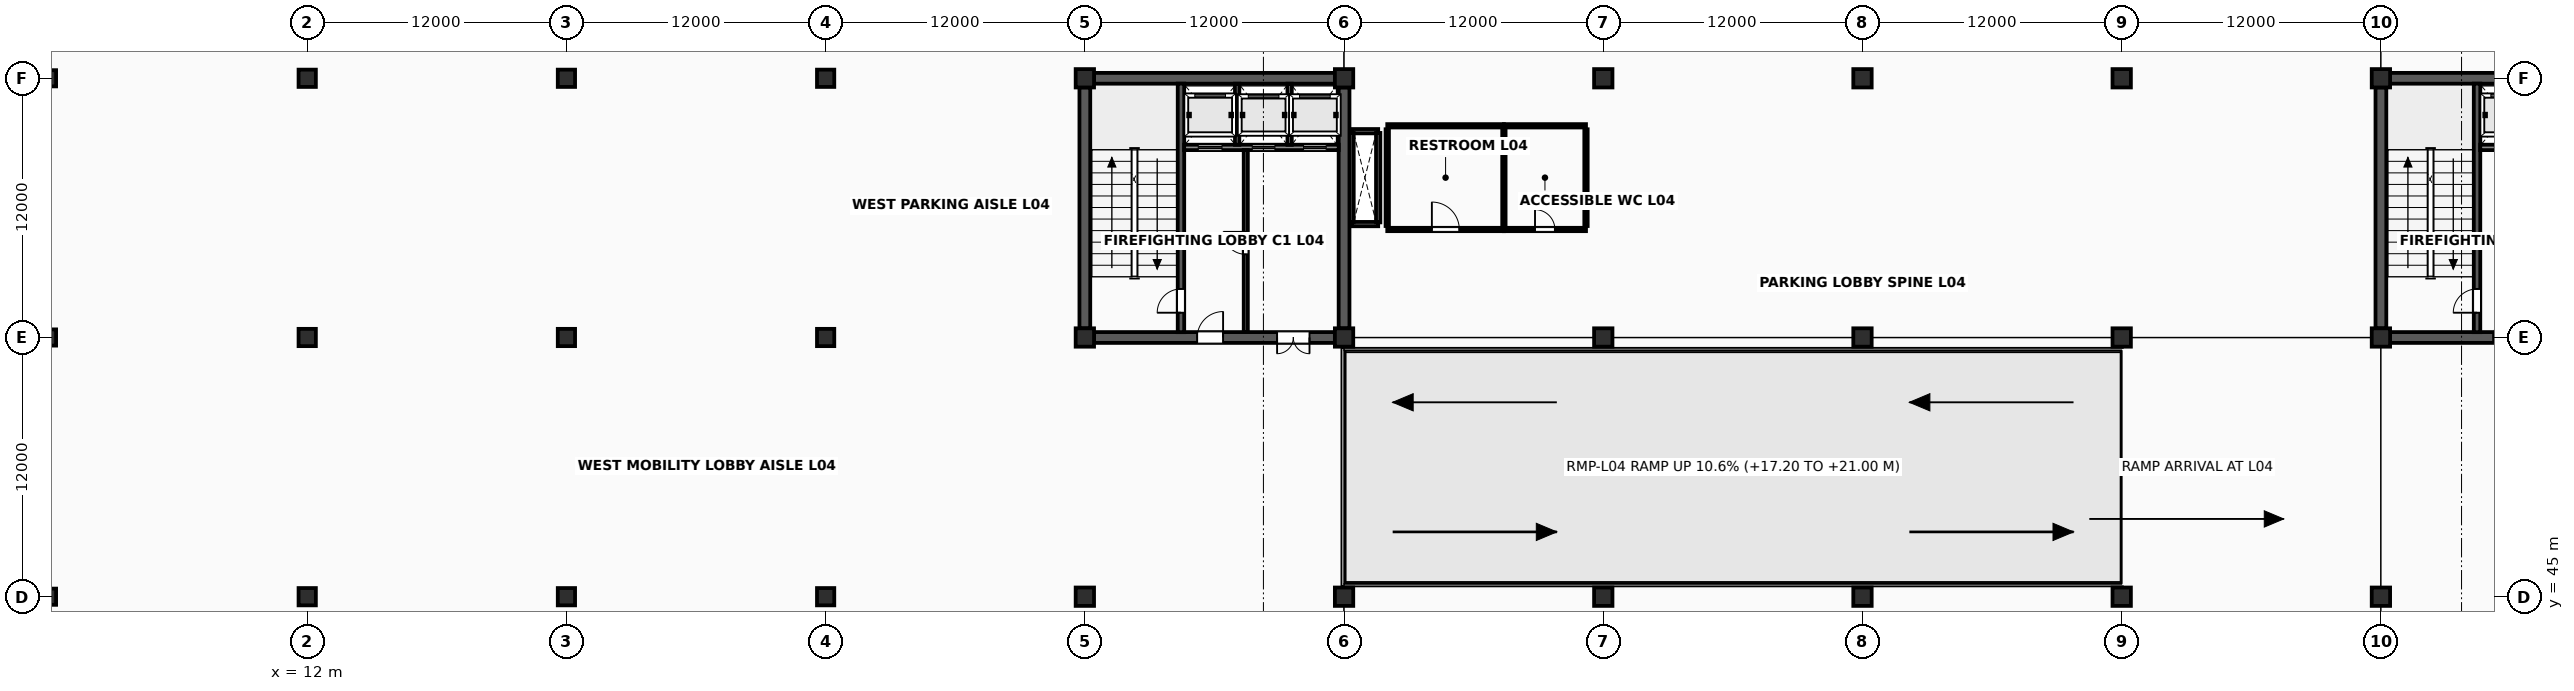
"""IFC4 building model, lengths in metres.
Left out: names, types, materials, properties, quantities, classifications, styles, units other than length and angle.
Written with IfcOpenShell. Run it as: python <this file> out.ifc"""

import sys

from ifc_helpers import new_model, si_unit, direction, frame, frame_2d, origin, origin_2d, place, context, subcontext, project, spatial, rectangle, extrude, element, fill, save


model = new_model("IFC4")
c1 = context("Model", 3, precision=1e-05, world=origin(), true_north=direction((0.0, 1.0)))
c2 = subcontext(c1, "Body", "Model", "MODEL_VIEW")
j1 = project(units=[si_unit("LENGTHUNIT", "METRE"), si_unit("PLANEANGLEUNIT", "RADIAN")], contexts=[c1])
p1 = place(None, origin())
s1 = spatial("IfcSite", under=j1, at=p1, CompositionType="ELEMENT")
p2 = place(p1, origin())
s2 = spatial("IfcBuilding", under=s1, at=p2, CompositionType="ELEMENT")
p3 = place(p2, frame((0.0, 0.0, 17.2)))
s3 = spatial("IfcBuildingStorey", under=s2, at=p3, CompositionType="ELEMENT", Elevation=17.2)
for number, where, z_axis, x_axis in (
    (1, (0.0, 45.0, 0.0), (0.0, 0.0, 1.0), (1.0, 0.0, 0.0)),
    (2, (0.0, 57.0, 0.0), (0.0, 0.0, 1.0), (1.0, 0.0, 0.0)),
    (3, (0.0, 69.0, 0.0), (0.0, 0.0, 1.0), (1.0, 0.0, 0.0)),
):
    element("IfcColumn", number, at=place(p3, frame(where, z_axis=z_axis, x_axis=x_axis)), inside=s3, PredefinedType="COLUMN", context=c2, shape_type="SweptSolid", body=[
        extrude(rectangle(XDim=0.75, YDim=0.75, at=origin_2d()), origin(), (0.0, 0.0, 1.0), 3.8),
    ])
for number, where, z_axis, x_axis in (
    (4, (12.0, 45.0, 0.0), (0.0, 0.0, 1.0), (1.0, 0.0, 0.0)),
    (5, (12.0, 57.0, 0.0), (0.0, 0.0, 1.0), (1.0, 0.0, 0.0)),
    (6, (12.0, 69.0, 0.0), (0.0, 0.0, 1.0), (1.0, 0.0, 0.0)),
    (7, (24.0, 45.0, 0.0), (0.0, 0.0, 1.0), (1.0, 0.0, 0.0)),
    (8, (24.0, 57.0, 0.0), (0.0, 0.0, 1.0), (1.0, 0.0, 0.0)),
    (9, (24.0, 69.0, 0.0), (0.0, 0.0, 1.0), (1.0, 0.0, 0.0)),
    (10, (36.0, 45.0, 0.0), (0.0, 0.0, 1.0), (1.0, 0.0, 0.0)),
    (11, (36.0, 57.0, 0.0), (0.0, 0.0, 1.0), (1.0, 0.0, 0.0)),
    (12, (36.0, 69.0, 0.0), (0.0, 0.0, 1.0), (1.0, 0.0, 0.0)),
):
    element("IfcColumn", number, at=place(p3, frame(where, z_axis=z_axis, x_axis=x_axis)), inside=s3, PredefinedType="COLUMN", context=c2, shape_type="SweptSolid", body=[
        extrude(rectangle(XDim=0.8, YDim=0.8, at=origin_2d()), origin(), (0.0, 0.0, 1.0), 3.8),
    ])
for number, where, z_axis, x_axis in (
    (13, (48.0, 45.0, 0.0), (0.0, 0.0, 1.0), (1.0, 0.0, 0.0)),
    (14, (48.0, 57.0, 0.0), (0.0, 0.0, 1.0), (1.0, 0.0, 0.0)),
    (15, (48.0, 69.0, 0.0), (0.0, 0.0, 1.0), (1.0, 0.0, 0.0)),
    (16, (60.0, 45.0, 0.0), (0.0, 0.0, 1.0), (1.0, 0.0, 0.0)),
    (17, (60.0, 57.0, 0.0), (0.0, 0.0, 1.0), (1.0, 0.0, 0.0)),
    (18, (60.0, 69.0, 0.0), (0.0, 0.0, 1.0), (1.0, 0.0, 0.0)),
    (19, (72.0, 45.0, 0.0), (0.0, 0.0, 1.0), (1.0, 0.0, 0.0)),
    (20, (72.0, 57.0, 0.0), (0.0, 0.0, 1.0), (1.0, 0.0, 0.0)),
    (21, (72.0, 69.0, 0.0), (0.0, 0.0, 1.0), (1.0, 0.0, 0.0)),
    (22, (84.0, 45.0, 0.0), (0.0, 0.0, 1.0), (1.0, 0.0, 0.0)),
    (23, (84.0, 57.0, 0.0), (0.0, 0.0, 1.0), (1.0, 0.0, 0.0)),
    (24, (84.0, 69.0, 0.0), (0.0, 0.0, 1.0), (1.0, 0.0, 0.0)),
    (25, (96.0, 45.0, 0.0), (0.0, 0.0, 1.0), (1.0, 0.0, 0.0)),
    (26, (96.0, 57.0, 0.0), (0.0, 0.0, 1.0), (1.0, 0.0, 0.0)),
    (27, (96.0, 69.0, 0.0), (0.0, 0.0, 1.0), (1.0, 0.0, 0.0)),
    (28, (108.0, 45.0, 0.0), (0.0, 0.0, 1.0), (1.0, 0.0, 0.0)),
    (29, (108.0, 57.0, 0.0), (0.0, 0.0, 1.0), (1.0, 0.0, 0.0)),
    (30, (108.0, 69.0, 0.0), (0.0, 0.0, 1.0), (1.0, 0.0, 0.0)),
):
    element("IfcColumn", number, at=place(p3, frame(where, z_axis=z_axis, x_axis=x_axis)), inside=s3, PredefinedType="COLUMN", context=c2, shape_type="SweptSolid", body=[
        extrude(rectangle(XDim=0.85, YDim=0.85, at=origin_2d()), origin(), (0.0, 0.0, 1.0), 3.8),
    ])
for number, where, z_axis, x_axis in (
    (31, (60.347, 62.25, 0.0), (0.0, 0.0, 1.0), (1.0, 0.0, 0.0)),
    (32, (60.347, 66.55, 0.0), (0.0, 0.0, 1.0), (1.0, 0.0, 0.0)),
):
    element("IfcWall", number, at=place(p3, frame(where, z_axis=z_axis, x_axis=x_axis)), inside=s3, PredefinedType="SOLIDWALL", context=c2, shape_type="SweptSolid", body=[
        extrude(rectangle(XDim=1.233, YDim=0.2, at=frame_2d((0.617, 0.0))), origin(), (0.0, 0.0, 1.0), 3.643),
    ])
for number, where, z_axis, x_axis in (
    (33, (60.347, 62.33, 0.0), (0.0, 0.0, 1.0), (0.0, 1.0, 0.0)),
    (34, (61.58, 62.33, 0.0), (0.0, 0.0, 1.0), (0.0, 1.0, 0.0)),
):
    element("IfcWall", number, at=place(p3, frame(where, z_axis=z_axis, x_axis=x_axis)), inside=s3, PredefinedType="SOLIDWALL", context=c2, shape_type="SweptSolid", body=[
        extrude(rectangle(XDim=4.14, YDim=0.2, at=frame_2d((2.07, 0.0))), origin(), (0.0, 0.0, 1.0), 3.643),
    ])
p4 = place(p3, frame((48.422, 57.0, 0.0), z_axis=(0.0, 0.0, 1.0), x_axis=(1.0, 0.0, 0.0)))
e35 = element("IfcWall", 35, at=p4, inside=s3, PredefinedType="SHEAR", context=c2, shape_type="SweptSolid", body=[
    extrude(rectangle(XDim=11.156, YDim=0.5, at=frame_2d((5.578, 0.0))), origin(), (0.0, 0.0, 1.0), 3.643),
])
p5 = place(p4, frame((4.778, 0.0, 0.0)))
e36 = element("IfcOpeningElement", 36, at=p5, cuts=e35, PredefinedType="OPENING", context=c2, shape_type="SweptSolid", body=[
    extrude(rectangle(XDim=1.2, YDim=2.2, at=frame_2d((0.6, 1.1))), frame((0.0, 0.265, 0.0), z_axis=(0.0, -1.0, 0.0), x_axis=(1.0, 0.0, 0.0)), (0.0, 0.0, 1.0), 0.53),
])
p6 = place(p4, frame((8.478, 0.0, 0.0)))
e37 = element("IfcOpeningElement", 37, at=p6, cuts=e35, PredefinedType="OPENING", context=c2, shape_type="SweptSolid", body=[
    extrude(rectangle(XDim=1.5, YDim=2.25, at=frame_2d((0.75, 1.125))), frame((0.0, 0.265, 0.0), z_axis=(0.0, -1.0, 0.0), x_axis=(1.0, 0.0, 0.0)), (0.0, 0.0, 1.0), 0.53),
])
for number, where, z_axis, x_axis in (
    (38, (48.422, 69.0, 0.0), (0.0, 0.0, 1.0), (1.0, 0.0, 0.0)),
    (39, (48.0, 57.422, 0.0), (0.0, 0.0, 1.0), (0.0, 1.0, 0.0)),
    (40, (60.0, 57.422, 0.0), (0.0, 0.0, 1.0), (0.0, 1.0, 0.0)),
):
    element("IfcWall", number, at=place(p3, frame(where, z_axis=z_axis, x_axis=x_axis)), inside=s3, PredefinedType="SHEAR", context=c2, shape_type="SweptSolid", body=[
        extrude(rectangle(XDim=11.156, YDim=0.5, at=frame_2d((5.578, 0.0))), origin(), (0.0, 0.0, 1.0), 3.643),
    ])
p7 = place(p3, frame((52.45, 57.247, 0.0), z_axis=(0.0, 0.0, 1.0), x_axis=(0.0, 1.0, 0.0)))
e41 = element("IfcWall", 41, at=p7, inside=s3, PredefinedType="SHEAR", context=c2, shape_type="SweptSolid", body=[
    extrude(rectangle(XDim=11.506, YDim=0.3, at=frame_2d((5.753, 0.0))), origin(), (0.0, 0.0, 1.0), 3.643),
])
p8 = place(p7, frame((0.9, 0.0, 0.0)))
e42 = element("IfcOpeningElement", 42, at=p8, cuts=e41, PredefinedType="OPENING", context=c2, shape_type="SweptSolid", body=[
    extrude(rectangle(XDim=1.1, YDim=2.2, at=frame_2d((0.55, 1.1))), frame((0.0, 0.165, 0.0), z_axis=(0.0, -1.0, 0.0), x_axis=(1.0, 0.0, 0.0)), (0.0, 0.0, 1.0), 0.33),
])
p9 = place(p3, frame((52.597, 65.8, 0.0), z_axis=(0.0, 0.0, 1.0), x_axis=(1.0, 0.0, 0.0)))
e43 = element("IfcWall", 43, at=p9, inside=s3, PredefinedType="SOLIDWALL", context=c2, shape_type="SweptSolid", body=[
    extrude(rectangle(XDim=7.156, YDim=0.25, at=frame_2d((3.578, 0.0))), origin(), (0.0, 0.0, 1.0), 3.643),
])
p10 = place(p9, frame((0.653, 0.0, 0.0)))
e44 = element("IfcOpeningElement", 44, at=p10, cuts=e43, PredefinedType="OPENING", context=c2, shape_type="SweptSolid", body=[
    extrude(rectangle(XDim=1.1, YDim=2.24, at=frame_2d((0.55, 1.12))), frame((0.0, 0.14, 0.0), z_axis=(0.0, -1.0, 0.0), x_axis=(1.0, 0.0, 0.0)), (0.0, 0.0, 1.0), 0.28),
])
p11 = place(p9, frame((3.153, 0.0, 0.0)))
e45 = element("IfcOpeningElement", 45, at=p11, cuts=e43, PredefinedType="OPENING", context=c2, shape_type="SweptSolid", body=[
    extrude(rectangle(XDim=1.05, YDim=2.2, at=frame_2d((0.525, 1.1))), frame((0.0, 0.14, 0.0), z_axis=(0.0, -1.0, 0.0), x_axis=(1.0, 0.0, 0.0)), (0.0, 0.0, 1.0), 0.28),
])
p12 = place(p9, frame((5.528, 0.0, 0.0)))
e46 = element("IfcOpeningElement", 46, at=p12, cuts=e43, PredefinedType="OPENING", context=c2, shape_type="SweptSolid", body=[
    extrude(rectangle(XDim=1.05, YDim=2.2, at=frame_2d((0.525, 1.1))), frame((0.0, 0.14, 0.0), z_axis=(0.0, -1.0, 0.0), x_axis=(1.0, 0.0, 0.0)), (0.0, 0.0, 1.0), 0.28),
])
for number, where, z_axis, x_axis in (
    (47, (55.05, 65.92, 0.0), (0.0, 0.0, 1.0), (0.0, 1.0, 0.0)),
    (48, (57.48, 65.92, 0.0), (0.0, 0.0, 1.0), (0.0, 1.0, 0.0)),
):
    element("IfcWall", number, at=place(p3, frame(where, z_axis=z_axis, x_axis=x_axis)), inside=s3, PredefinedType="SOLIDWALL", context=c2, shape_type="SweptSolid", body=[
        extrude(rectangle(XDim=2.83, YDim=0.2, at=frame_2d((1.415, 0.0))), origin(), (0.0, 0.0, 1.0), 3.633),
    ])
p13 = place(p3, frame((55.45, 57.25, 0.0), z_axis=(0.0, 0.0, 1.0), x_axis=(0.0, 1.0, 0.0)))
e49 = element("IfcWall", 49, at=p13, inside=s3, PredefinedType="SOLIDWALL", context=c2, shape_type="SweptSolid", body=[
    extrude(rectangle(XDim=8.43, YDim=0.19, at=frame_2d((4.215, 0.0))), origin(), (0.0, 0.0, 1.0), 3.633),
])
p14 = place(p13, frame((3.6, 0.0, 0.0)))
e50 = element("IfcOpeningElement", 50, at=p14, cuts=e49, PredefinedType="OPENING", context=c2, shape_type="SweptSolid", body=[
    extrude(rectangle(XDim=1.04, YDim=2.18, at=frame_2d((0.52, 1.09))), frame((0.0, 0.11, 0.0), z_axis=(0.0, -1.0, 0.0), x_axis=(1.0, 0.0, 0.0)), (0.0, 0.0, 1.0), 0.22),
])
p15 = place(p3, frame((108.422, 57.0, 0.0), z_axis=(0.0, 0.0, 1.0), x_axis=(1.0, 0.0, 0.0)))
e51 = element("IfcWall", 51, at=p15, inside=s3, PredefinedType="SHEAR", context=c2, shape_type="SweptSolid", body=[
    extrude(rectangle(XDim=11.156, YDim=0.5, at=frame_2d((5.578, 0.0))), origin(), (0.0, 0.0, 1.0), 3.643),
])
p16 = place(p15, frame((4.778, 0.0, 0.0)))
e52 = element("IfcOpeningElement", 52, at=p16, cuts=e51, PredefinedType="OPENING", context=c2, shape_type="SweptSolid", body=[
    extrude(rectangle(XDim=1.2, YDim=2.2, at=frame_2d((0.6, 1.1))), frame((0.0, 0.265, 0.0), z_axis=(0.0, -1.0, 0.0), x_axis=(1.0, 0.0, 0.0)), (0.0, 0.0, 1.0), 0.53),
])
p17 = place(p15, frame((8.478, 0.0, 0.0)))
e53 = element("IfcOpeningElement", 53, at=p17, cuts=e51, PredefinedType="OPENING", context=c2, shape_type="SweptSolid", body=[
    extrude(rectangle(XDim=1.5, YDim=2.25, at=frame_2d((0.75, 1.125))), frame((0.0, 0.265, 0.0), z_axis=(0.0, -1.0, 0.0), x_axis=(1.0, 0.0, 0.0)), (0.0, 0.0, 1.0), 0.53),
])
for number, where, z_axis, x_axis in (
    (54, (108.422, 69.0, 0.0), (0.0, 0.0, 1.0), (1.0, 0.0, 0.0)),
    (55, (108.0, 57.422, 0.0), (0.0, 0.0, 1.0), (0.0, 1.0, 0.0)),
):
    element("IfcWall", number, at=place(p3, frame(where, z_axis=z_axis, x_axis=x_axis)), inside=s3, PredefinedType="SHEAR", context=c2, shape_type="SweptSolid", body=[
        extrude(rectangle(XDim=11.156, YDim=0.5, at=frame_2d((5.578, 0.0))), origin(), (0.0, 0.0, 1.0), 3.643),
    ])
p18 = place(p3, frame((112.45, 57.247, 0.0), z_axis=(0.0, 0.0, 1.0), x_axis=(0.0, 1.0, 0.0)))
e56 = element("IfcWall", 56, at=p18, inside=s3, PredefinedType="SHEAR", context=c2, shape_type="SweptSolid", body=[
    extrude(rectangle(XDim=11.506, YDim=0.3, at=frame_2d((5.753, 0.0))), origin(), (0.0, 0.0, 1.0), 3.643),
])
p19 = place(p18, frame((0.9, 0.0, 0.0)))
e57 = element("IfcOpeningElement", 57, at=p19, cuts=e56, PredefinedType="OPENING", context=c2, shape_type="SweptSolid", body=[
    extrude(rectangle(XDim=1.1, YDim=2.2, at=frame_2d((0.55, 1.1))), frame((0.0, 0.165, 0.0), z_axis=(0.0, -1.0, 0.0), x_axis=(1.0, 0.0, 0.0)), (0.0, 0.0, 1.0), 0.33),
])
p20 = place(p3, frame((112.597, 65.8, 0.0), z_axis=(0.0, 0.0, 1.0), x_axis=(1.0, 0.0, 0.0)))
e58 = element("IfcWall", 58, at=p20, inside=s3, PredefinedType="SOLIDWALL", context=c2, shape_type="SweptSolid", body=[
    extrude(rectangle(XDim=7.156, YDim=0.25, at=frame_2d((3.578, 0.0))), origin(), (0.0, 0.0, 1.0), 3.643),
])
p21 = place(p20, frame((0.653, 0.0, 0.0)))
e59 = element("IfcOpeningElement", 59, at=p21, cuts=e58, PredefinedType="OPENING", context=c2, shape_type="SweptSolid", body=[
    extrude(rectangle(XDim=1.1, YDim=2.24, at=frame_2d((0.55, 1.12))), frame((0.0, 0.14, 0.0), z_axis=(0.0, -1.0, 0.0), x_axis=(1.0, 0.0, 0.0)), (0.0, 0.0, 1.0), 0.28),
])
p22 = place(p20, frame((3.153, 0.0, 0.0)))
e60 = element("IfcOpeningElement", 60, at=p22, cuts=e58, PredefinedType="OPENING", context=c2, shape_type="SweptSolid", body=[
    extrude(rectangle(XDim=1.05, YDim=2.2, at=frame_2d((0.525, 1.1))), frame((0.0, 0.14, 0.0), z_axis=(0.0, -1.0, 0.0), x_axis=(1.0, 0.0, 0.0)), (0.0, 0.0, 1.0), 0.28),
])
p23 = place(p20, frame((5.528, 0.0, 0.0)))
e61 = element("IfcOpeningElement", 61, at=p23, cuts=e58, PredefinedType="OPENING", context=c2, shape_type="SweptSolid", body=[
    extrude(rectangle(XDim=1.05, YDim=2.2, at=frame_2d((0.525, 1.1))), frame((0.0, 0.14, 0.0), z_axis=(0.0, -1.0, 0.0), x_axis=(1.0, 0.0, 0.0)), (0.0, 0.0, 1.0), 0.28),
])
p24 = place(p3, frame((62.0, 62.0, 0.0), z_axis=(0.0, 0.0, 1.0), x_axis=(1.0, 0.0, 0.0)))
e62 = element("IfcWall", 62, at=p24, inside=s3, PredefinedType="PLUMBINGWALL", context=c2, shape_type="SweptSolid", body=[
    extrude(rectangle(XDim=5.4, YDim=0.155, at=frame_2d((2.7, 0.0))), origin(), (0.0, 0.0, 1.0), 2.75),
])
p25 = place(p24, frame((2.065, 0.0, 0.0)))
e63 = element("IfcOpeningElement", 63, at=p25, cuts=e62, PredefinedType="OPENING", context=c2, shape_type="SweptSolid", body=[
    extrude(rectangle(XDim=1.27, YDim=2.27, at=frame_2d((0.635, 1.135))), frame((0.0, 0.093, 0.0), z_axis=(0.0, -1.0, 0.0), x_axis=(1.0, 0.0, 0.0)), (0.0, 0.0, 1.0), 0.185),
])
p26 = place(p3, frame((62.0, 66.8, 0.0), z_axis=(0.0, 0.0, 1.0), x_axis=(1.0, 0.0, 0.0)))
e64 = element("IfcWall", 64, at=p26, inside=s3, PredefinedType="PLUMBINGWALL", context=c2, shape_type="SweptSolid", body=[
    extrude(rectangle(XDim=5.4, YDim=0.155, at=frame_2d((2.7, 0.0))), origin(), (0.0, 0.0, 1.0), 2.75),
])
for number, where, z_axis, x_axis in (
    (65, (62.0, 62.16, 0.0), (0.0, 0.0, 1.0), (0.0, 1.0, 0.0)),
    (66, (67.4, 62.16, 0.0), (0.0, 0.0, 1.0), (0.0, 1.0, 0.0)),
):
    element("IfcWall", number, at=place(p3, frame(where, z_axis=z_axis, x_axis=x_axis)), inside=s3, PredefinedType="PLUMBINGWALL", context=c2, shape_type="SweptSolid", body=[
        extrude(rectangle(XDim=4.48, YDim=0.155, at=frame_2d((2.24, 0.0))), origin(), (0.0, 0.0, 1.0), 2.75),
    ])
p27 = place(p3, frame((67.4, 62.0, 0.0), z_axis=(0.0, 0.0, 1.0), x_axis=(1.0, 0.0, 0.0)))
e67 = element("IfcWall", 67, at=p27, inside=s3, PredefinedType="PLUMBINGWALL", context=c2, shape_type="SweptSolid", body=[
    extrude(rectangle(XDim=3.8, YDim=0.155, at=frame_2d((1.9, 0.0))), origin(), (0.0, 0.0, 1.0), 2.75),
])
p28 = place(p27, frame((1.44, 0.0, 0.0)))
e68 = element("IfcOpeningElement", 68, at=p28, cuts=e67, PredefinedType="OPENING", context=c2, shape_type="SweptSolid", body=[
    extrude(rectangle(XDim=0.92, YDim=2.1, at=frame_2d((0.46, 1.05))), frame((0.0, 0.093, 0.0), z_axis=(0.0, -1.0, 0.0), x_axis=(1.0, 0.0, 0.0)), (0.0, 0.0, 1.0), 0.185),
])
p29 = place(p3, frame((67.4, 66.8, 0.0), z_axis=(0.0, 0.0, 1.0), x_axis=(1.0, 0.0, 0.0)))
e69 = element("IfcWall", 69, at=p29, inside=s3, PredefinedType="PLUMBINGWALL", context=c2, shape_type="SweptSolid", body=[
    extrude(rectangle(XDim=3.8, YDim=0.155, at=frame_2d((1.9, 0.0))), origin(), (0.0, 0.0, 1.0), 2.75),
])
p30 = place(p3, frame((71.2, 62.16, 0.0), z_axis=(0.0, 0.0, 1.0), x_axis=(0.0, 1.0, 0.0)))
e70 = element("IfcWall", 70, at=p30, inside=s3, PredefinedType="PLUMBINGWALL", context=c2, shape_type="SweptSolid", body=[
    extrude(rectangle(XDim=4.48, YDim=0.155, at=frame_2d((2.24, 0.0))), origin(), (0.0, 0.0, 1.0), 2.75),
])
p31 = place(p8, origin())
e71 = element("IfcDoor", 71, at=p31, inside=s3, OperationType="SINGLE_SWING_LEFT", PredefinedType="DOOR", context=c2, shape_type="SweptSolid", body=[
    extrude(rectangle(XDim=1.1, YDim=2.2, at=frame_2d((0.55, 1.1))), frame((0.0, 0.025, 0.0), z_axis=(0.0, -1.0, 0.0), x_axis=(1.0, 0.0, 0.0)), (0.0, 0.0, 1.0), 0.05),
])
fill(e42, e71)
p32 = place(p14, origin())
e72 = element("IfcDoor", 72, at=p32, inside=s3, OperationType="SINGLE_SWING_RIGHT", PredefinedType="DOOR", context=c2, shape_type="SweptSolid", body=[
    extrude(rectangle(XDim=1.04, YDim=2.18, at=frame_2d((0.52, 1.09))), frame((0.0, 0.025, 0.0), z_axis=(0.0, -1.0, 0.0), x_axis=(1.0, 0.0, 0.0)), (0.0, 0.0, 1.0), 0.05),
])
fill(e50, e72)
p33 = place(p5, origin())
e73 = element("IfcDoor", 73, at=p33, inside=s3, OperationType="SINGLE_SWING_RIGHT", PredefinedType="DOOR", context=c2, shape_type="SweptSolid", body=[
    extrude(rectangle(XDim=1.2, YDim=2.2, at=frame_2d((0.6, 1.1))), frame((0.0, 0.025, 0.0), z_axis=(0.0, -1.0, 0.0), x_axis=(1.0, 0.0, 0.0)), (0.0, 0.0, 1.0), 0.05),
])
fill(e36, e73)
p34 = place(p6, origin())
e74 = element("IfcDoor", 74, at=p34, inside=s3, OperationType="DOUBLE_DOOR_SINGLE_SWING", PredefinedType="DOOR", context=c2, shape_type="SweptSolid", body=[
    extrude(rectangle(XDim=1.5, YDim=2.25, at=frame_2d((0.75, 1.125))), frame((0.0, 0.025, 0.0), z_axis=(0.0, -1.0, 0.0), x_axis=(1.0, 0.0, 0.0)), (0.0, 0.0, 1.0), 0.05),
])
fill(e37, e74)
p35 = place(p10, origin())
e75 = element("IfcDoor", 75, at=p35, inside=s3, OperationType="SLIDING_TO_LEFT", PredefinedType="USERDEFINED", context=c2, shape_type="SweptSolid", body=[
    extrude(rectangle(XDim=1.1, YDim=2.24, at=frame_2d((0.55, 1.12))), frame((0.0, 0.025, 0.0), z_axis=(0.0, -1.0, 0.0), x_axis=(1.0, 0.0, 0.0)), (0.0, 0.0, 1.0), 0.05),
])
fill(e44, e75)
p36 = place(p11, origin())
e76 = element("IfcDoor", 76, at=p36, inside=s3, OperationType="SLIDING_TO_LEFT", PredefinedType="USERDEFINED", context=c2, shape_type="SweptSolid", body=[
    extrude(rectangle(XDim=1.05, YDim=2.2, at=frame_2d((0.525, 1.1))), frame((0.0, 0.025, 0.0), z_axis=(0.0, -1.0, 0.0), x_axis=(1.0, 0.0, 0.0)), (0.0, 0.0, 1.0), 0.05),
])
fill(e45, e76)
p37 = place(p12, origin())
e77 = element("IfcDoor", 77, at=p37, inside=s3, OperationType="SLIDING_TO_LEFT", PredefinedType="USERDEFINED", context=c2, shape_type="SweptSolid", body=[
    extrude(rectangle(XDim=1.05, YDim=2.2, at=frame_2d((0.525, 1.1))), frame((0.0, 0.025, 0.0), z_axis=(0.0, -1.0, 0.0), x_axis=(1.0, 0.0, 0.0)), (0.0, 0.0, 1.0), 0.05),
])
fill(e46, e77)
p38 = place(p19, origin())
e78 = element("IfcDoor", 78, at=p38, inside=s3, OperationType="SINGLE_SWING_LEFT", PredefinedType="DOOR", context=c2, shape_type="SweptSolid", body=[
    extrude(rectangle(XDim=1.1, YDim=2.2, at=frame_2d((0.55, 1.1))), frame((0.0, 0.025, 0.0), z_axis=(0.0, -1.0, 0.0), x_axis=(1.0, 0.0, 0.0)), (0.0, 0.0, 1.0), 0.05),
])
fill(e57, e78)
p39 = place(p16, origin())
e79 = element("IfcDoor", 79, at=p39, inside=s3, OperationType="SINGLE_SWING_RIGHT", PredefinedType="DOOR", context=c2, shape_type="SweptSolid", body=[
    extrude(rectangle(XDim=1.2, YDim=2.2, at=frame_2d((0.6, 1.1))), frame((0.0, 0.025, 0.0), z_axis=(0.0, -1.0, 0.0), x_axis=(1.0, 0.0, 0.0)), (0.0, 0.0, 1.0), 0.05),
])
fill(e52, e79)
p40 = place(p25, origin())
e80 = element("IfcDoor", 80, at=p40, inside=s3, OperationType="SINGLE_SWING_LEFT", PredefinedType="DOOR", context=c2, shape_type="SweptSolid", body=[
    extrude(rectangle(XDim=1.27, YDim=2.27, at=frame_2d((0.635, 1.135))), frame((0.0, 0.025, 0.0), z_axis=(0.0, -1.0, 0.0), x_axis=(1.0, 0.0, 0.0)), (0.0, 0.0, 1.0), 0.05),
])
fill(e63, e80)
p41 = place(p28, origin())
e81 = element("IfcDoor", 81, at=p41, inside=s3, OperationType="SINGLE_SWING_LEFT", PredefinedType="DOOR", context=c2, shape_type="SweptSolid", body=[
    extrude(rectangle(XDim=0.92, YDim=2.1, at=frame_2d((0.46, 1.05))), frame((0.0, 0.025, 0.0), z_axis=(0.0, -1.0, 0.0), x_axis=(1.0, 0.0, 0.0)), (0.0, 0.0, 1.0), 0.05),
])
fill(e68, e81)
save(model, sys.argv[1])
